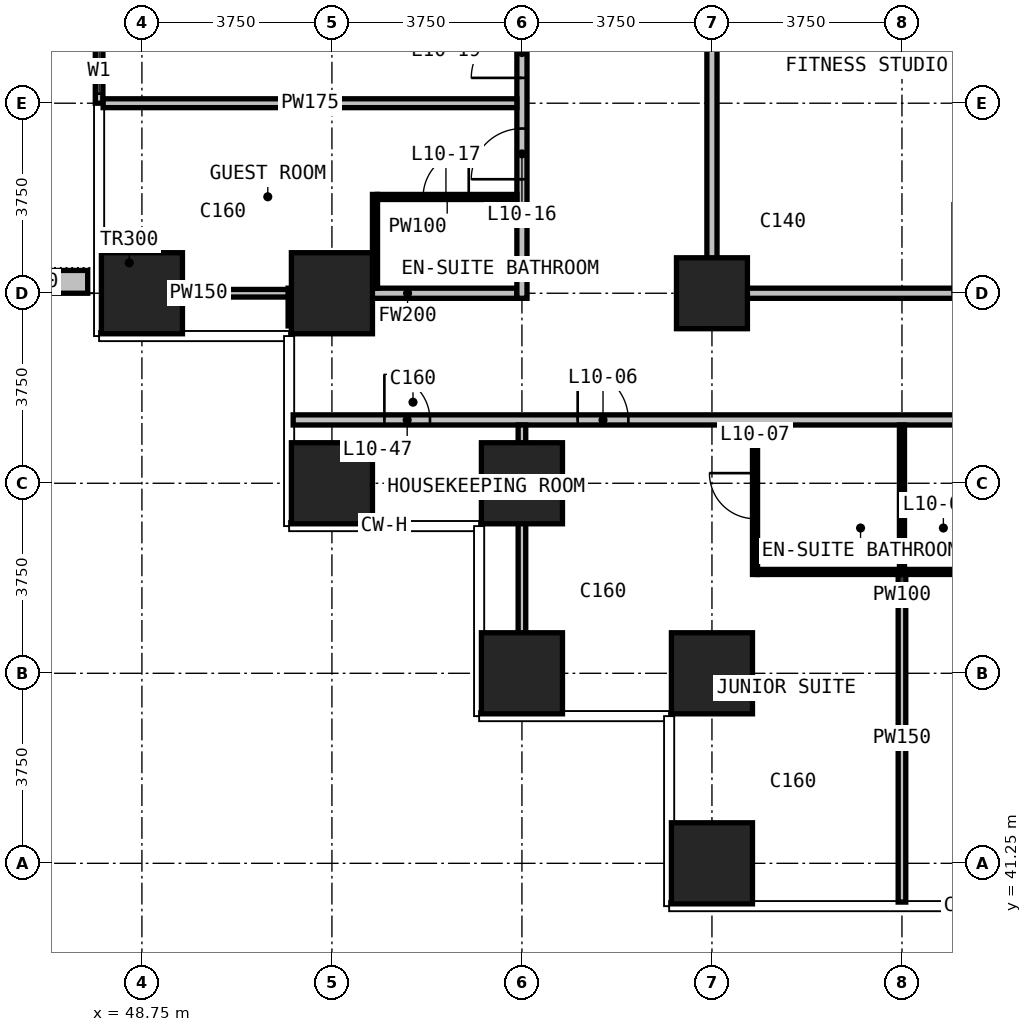
"""IFC4 building model, lengths in metres.
Left out: names, types, materials, properties, quantities, classifications, styles, units other than length and angle.
Written with IfcOpenShell. Run it as: python <this file> out.ifc"""

import sys

from ifc_helpers import new_model, si_unit, direction, frame, frame_2d, origin, origin_2d, place, context, subcontext, project, spatial, rectangle, extrude, element, fill, save


model = new_model("IFC4")
c1 = context("Model", 3, precision=1e-05, world=origin(), true_north=direction((0.0, 1.0)))
c2 = subcontext(c1, "Body", "Model", "MODEL_VIEW")
j1 = project(units=[si_unit("LENGTHUNIT", "METRE"), si_unit("PLANEANGLEUNIT", "RADIAN")], contexts=[c1])
p1 = place(None, origin())
s1 = spatial("IfcSite", under=j1, at=p1, CompositionType="ELEMENT")
p2 = place(p1, origin())
s2 = spatial("IfcBuilding", under=s1, at=p2, CompositionType="ELEMENT")
p3 = place(p2, frame((0.0, 0.0, 52.7)))
s3 = spatial("IfcBuildingStorey", under=s2, at=p3, CompositionType="ELEMENT", Elevation=52.7)
for number, where, z_axis, x_axis in (
    (1, (48.75, 52.5, 0.0), (0.0, 0.0, 1.0), (1.0, 0.0, 0.0)),
    (2, (52.5, 48.75, 0.0), (0.0, 0.0, 1.0), (1.0, 0.0, 0.0)),
    (3, (52.5, 52.5, 0.0), (0.0, 0.0, 1.0), (1.0, 0.0, 0.0)),
    (4, (56.25, 45.0, 0.0), (0.0, 0.0, 1.0), (1.0, 0.0, 0.0)),
    (5, (56.25, 48.75, 0.0), (0.0, 0.0, 1.0), (1.0, 0.0, 0.0)),
    (6, (60.0, 41.25, 0.0), (0.0, 0.0, 1.0), (1.0, 0.0, 0.0)),
    (7, (60.0, 45.0, 0.0), (0.0, 0.0, 1.0), (1.0, 0.0, 0.0)),
):
    element("IfcColumn", number, at=place(p3, frame(where, z_axis=z_axis, x_axis=x_axis)), inside=s3, PredefinedType="COLUMN", context=c2, shape_type="SweptSolid", body=[
        extrude(rectangle(XDim=1.6, YDim=1.6, at=origin_2d()), origin(), (0.0, 0.0, 1.0), 3.3),
    ])
p4 = place(p3, frame((60.0, 52.5, 0.0), z_axis=(0.0, 0.0, 1.0), x_axis=(1.0, 0.0, 0.0)))
e8 = element("IfcColumn", 8, at=p4, inside=s3, PredefinedType="COLUMN", context=c2, shape_type="SweptSolid", body=[
    extrude(rectangle(XDim=1.4, YDim=1.4, at=origin_2d()), origin(), (0.0, 0.0, 1.0), 3.3),
])
p5 = place(p3, frame((47.905, 56.25, 0.0), z_axis=(0.0, 0.0, 1.0), x_axis=(0.0, 1.0, 0.0)))
e9 = element("IfcWall", 9, at=p5, inside=s3, PredefinedType="SOLIDWALL", context=c2, shape_type="SweptSolid", body=[
    extrude(rectangle(XDim=3.75, YDim=0.15, at=frame_2d((1.875, 0.0))), origin(), (0.0, 0.0, 1.0), 3.0),
])
p6 = place(p5, frame((0.188, 0.0, 0.1)))
e10 = element("IfcOpeningElement", 10, at=p6, cuts=e9, PredefinedType="OPENING", context=c2, shape_type="SweptSolid", body=[
    extrude(rectangle(XDim=0.9, YDim=2.4, at=frame_2d((0.45, 1.2))), frame((0.0, 0.085, 0.0), z_axis=(0.0, -1.0, 0.0), x_axis=(1.0, 0.0, 0.0)), (0.0, 0.0, 1.0), 0.17),
])
p7 = place(p5, frame((1.275, 0.0, 0.0)))
e11 = element("IfcOpeningElement", 11, at=p7, cuts=e9, PredefinedType="OPENING", context=c2, shape_type="SweptSolid", body=[
    extrude(rectangle(XDim=1.2, YDim=2.4, at=frame_2d((0.6, 1.2))), frame((0.0, 0.085, 0.0), z_axis=(0.0, -1.0, 0.0), x_axis=(1.0, 0.0, 0.0)), (0.0, 0.0, 1.0), 0.17),
])
p8 = place(p3, frame((47.68, 52.725, 0.0), z_axis=(0.0, 0.0, 1.0), x_axis=(-1.0, 0.0, 0.0)))
e12 = element("IfcWall", 12, at=p8, inside=s3, PredefinedType="USERDEFINED", context=c2, shape_type="SweptSolid", body=[
    extrude(rectangle(XDim=2.33, YDim=0.45, at=frame_2d((1.165, 0.0))), origin(), (0.0, 0.0, 1.0), 1.1),
])
p9 = place(p3, frame((51.735, 50.0, 0.0), z_axis=(0.0, 0.0, 1.0), x_axis=(1.0, 0.0, 0.0)))
e13 = element("IfcWall", 13, at=p9, inside=s3, PredefinedType="PARTITIONING", context=c2, shape_type="SweptSolid", body=[
    extrude(rectangle(XDim=46.53, YDim=0.2, at=frame_2d((23.265, 0.0))), origin(), (0.0, 0.0, 1.0), 3.0),
])
p10 = place(p9, frame((5.615, 0.0, 0.0)))
e14 = element("IfcOpeningElement", 14, at=p10, cuts=e13, PredefinedType="OPENING", context=c2, shape_type="SweptSolid", body=[
    extrude(rectangle(XDim=1.0, YDim=2.2, at=frame_2d((0.5, 1.1))), frame((0.0, 0.11, 0.0), z_axis=(0.0, -1.0, 0.0), x_axis=(1.0, 0.0, 0.0)), (0.0, 0.0, 1.0), 0.22),
])
p11 = place(p9, frame((17.415, 0.0, 0.0)))
e15 = element("IfcOpeningElement", 15, at=p11, cuts=e13, PredefinedType="OPENING", context=c2, shape_type="SweptSolid", body=[
    extrude(rectangle(XDim=1.0, YDim=2.2, at=frame_2d((0.5, 1.1))), frame((0.0, 0.11, 0.0), z_axis=(0.0, -1.0, 0.0), x_axis=(1.0, 0.0, 0.0)), (0.0, 0.0, 1.0), 0.22),
])
p12 = place(p9, frame((20.615, 0.0, 0.0)))
e16 = element("IfcOpeningElement", 16, at=p12, cuts=e13, PredefinedType="OPENING", context=c2, shape_type="SweptSolid", body=[
    extrude(rectangle(XDim=1.0, YDim=2.2, at=frame_2d((0.5, 1.1))), frame((0.0, 0.11, 0.0), z_axis=(0.0, -1.0, 0.0), x_axis=(1.0, 0.0, 0.0)), (0.0, 0.0, 1.0), 0.22),
])
p13 = place(p9, frame((32.415, 0.0, 0.0)))
e17 = element("IfcOpeningElement", 17, at=p13, cuts=e13, PredefinedType="OPENING", context=c2, shape_type="SweptSolid", body=[
    extrude(rectangle(XDim=1.0, YDim=2.2, at=frame_2d((0.5, 1.1))), frame((0.0, 0.11, 0.0), z_axis=(0.0, -1.0, 0.0), x_axis=(1.0, 0.0, 0.0)), (0.0, 0.0, 1.0), 0.22),
])
p14 = place(p9, frame((35.615, 0.0, 0.0)))
e18 = element("IfcOpeningElement", 18, at=p14, cuts=e13, PredefinedType="OPENING", context=c2, shape_type="SweptSolid", body=[
    extrude(rectangle(XDim=1.0, YDim=2.2, at=frame_2d((0.5, 1.1))), frame((0.0, 0.11, 0.0), z_axis=(0.0, -1.0, 0.0), x_axis=(1.0, 0.0, 0.0)), (0.0, 0.0, 1.0), 0.22),
])
p15 = place(p9, frame((1.8, 0.0, 0.0)))
e19 = element("IfcOpeningElement", 19, at=p15, cuts=e13, PredefinedType="OPENING", context=c2, shape_type="SweptSolid", body=[
    extrude(rectangle(XDim=0.9, YDim=2.2, at=frame_2d((0.45, 1.1))), frame((0.0, 0.11, 0.0), z_axis=(0.0, -1.0, 0.0), x_axis=(1.0, 0.0, 0.0)), (0.0, 0.0, 1.0), 0.22),
])
p16 = place(p9, frame((43.815, 0.0, 0.0)))
e20 = element("IfcOpeningElement", 20, at=p16, cuts=e13, PredefinedType="OPENING", context=c2, shape_type="SweptSolid", body=[
    extrude(rectangle(XDim=0.9, YDim=2.2, at=frame_2d((0.45, 1.1))), frame((0.0, 0.11, 0.0), z_axis=(0.0, -1.0, 0.0), x_axis=(1.0, 0.0, 0.0)), (0.0, 0.0, 1.0), 0.22),
])
p17 = place(p3, frame((51.835, 52.5, 0.0), z_axis=(0.0, 0.0, 1.0), x_axis=(1.0, 0.0, 0.0)))
e21 = element("IfcWall", 21, at=p17, inside=s3, PredefinedType="PARTITIONING", context=c2, shape_type="SweptSolid", body=[
    extrude(rectangle(XDim=4.315, YDim=0.2, at=frame_2d((2.157, 0.0))), origin(), (0.0, 0.0, 1.0), 3.0),
])
p18 = place(p3, frame((60.1, 52.5, 0.0), z_axis=(0.0, 0.0, 1.0), x_axis=(1.0, 0.0, 0.0)))
e22 = element("IfcWall", 22, at=p18, inside=s3, PredefinedType="PARTITIONING", context=c2, shape_type="SweptSolid", body=[
    extrude(rectangle(XDim=29.8, YDim=0.2, at=frame_2d((14.9, 0.0))), origin(), (0.0, 0.0, 1.0), 3.0),
])
p19 = place(p18, frame((4.65, 0.0, 0.0)))
e23 = element("IfcOpeningElement", 23, at=p19, cuts=e22, PredefinedType="OPENING", context=c2, shape_type="SweptSolid", body=[
    extrude(rectangle(XDim=1.8, YDim=2.2, at=frame_2d((0.9, 1.1))), frame((0.0, 0.11, 0.0), z_axis=(0.0, -1.0, 0.0), x_axis=(1.0, 0.0, 0.0)), (0.0, 0.0, 1.0), 0.22),
])
p20 = place(p18, frame((15.6, 0.0, 0.0)))
e24 = element("IfcOpeningElement", 24, at=p20, cuts=e22, PredefinedType="OPENING", context=c2, shape_type="SweptSolid", body=[
    extrude(rectangle(XDim=1.0, YDim=2.2, at=frame_2d((0.5, 1.1))), frame((0.0, 0.11, 0.0), z_axis=(0.0, -1.0, 0.0), x_axis=(1.0, 0.0, 0.0)), (0.0, 0.0, 1.0), 0.22),
])
p21 = place(p18, frame((23.1, 0.0, 0.0)))
e25 = element("IfcOpeningElement", 25, at=p21, cuts=e22, PredefinedType="OPENING", context=c2, shape_type="SweptSolid", body=[
    extrude(rectangle(XDim=1.0, YDim=2.2, at=frame_2d((0.5, 1.1))), frame((0.0, 0.11, 0.0), z_axis=(0.0, -1.0, 0.0), x_axis=(1.0, 0.0, 0.0)), (0.0, 0.0, 1.0), 0.22),
])
p22 = place(p3, frame((51.735, 51.855, 0.0), z_axis=(0.0, 0.0, 1.0), x_axis=(0.0, 1.0, 0.0)))
e26 = element("IfcWall", 26, at=p22, inside=s3, PredefinedType="PARTITIONING", context=c2, shape_type="SweptSolid", body=[
    extrude(rectangle(XDim=0.745, YDim=0.2, at=frame_2d((0.373, 0.0))), origin(), (0.0, 0.0, 1.0), 3.0),
])
p23 = place(p3, frame((56.25, 52.4, 0.0), z_axis=(0.0, 0.0, 1.0), x_axis=(0.0, 1.0, 0.0)))
e27 = element("IfcWall", 27, at=p23, inside=s3, PredefinedType="PARTITIONING", context=c2, shape_type="SweptSolid", body=[
    extrude(rectangle(XDim=33.925, YDim=0.2, at=frame_2d((16.962, 0.0))), origin(), (0.0, 0.0, 1.0), 3.0),
])
p24 = place(p23, frame((2.35, 0.0, 0.0)))
e28 = element("IfcOpeningElement", 28, at=p24, cuts=e27, PredefinedType="OPENING", context=c2, shape_type="SweptSolid", body=[
    extrude(rectangle(XDim=1.0, YDim=2.2, at=frame_2d((0.5, 1.1))), frame((0.0, 0.11, 0.0), z_axis=(0.0, -1.0, 0.0), x_axis=(1.0, 0.0, 0.0)), (0.0, 0.0, 1.0), 0.22),
])
p25 = place(p23, frame((4.35, 0.0, 0.0)))
e29 = element("IfcOpeningElement", 29, at=p25, cuts=e27, PredefinedType="OPENING", context=c2, shape_type="SweptSolid", body=[
    extrude(rectangle(XDim=1.0, YDim=2.2, at=frame_2d((0.5, 1.1))), frame((0.0, 0.11, 0.0), z_axis=(0.0, -1.0, 0.0), x_axis=(1.0, 0.0, 0.0)), (0.0, 0.0, 1.0), 0.22),
])
p26 = place(p23, frame((9.85, 0.0, 0.0)))
e30 = element("IfcOpeningElement", 30, at=p26, cuts=e27, PredefinedType="OPENING", context=c2, shape_type="SweptSolid", body=[
    extrude(rectangle(XDim=1.0, YDim=2.2, at=frame_2d((0.5, 1.1))), frame((0.0, 0.11, 0.0), z_axis=(0.0, -1.0, 0.0), x_axis=(1.0, 0.0, 0.0)), (0.0, 0.0, 1.0), 0.22),
])
p27 = place(p23, frame((11.85, 0.0, 0.0)))
e31 = element("IfcOpeningElement", 31, at=p27, cuts=e27, PredefinedType="OPENING", context=c2, shape_type="SweptSolid", body=[
    extrude(rectangle(XDim=1.0, YDim=2.2, at=frame_2d((0.5, 1.1))), frame((0.0, 0.11, 0.0), z_axis=(0.0, -1.0, 0.0), x_axis=(1.0, 0.0, 0.0)), (0.0, 0.0, 1.0), 0.22),
])
p28 = place(p23, frame((17.35, 0.0, 0.0)))
e32 = element("IfcOpeningElement", 32, at=p28, cuts=e27, PredefinedType="OPENING", context=c2, shape_type="SweptSolid", body=[
    extrude(rectangle(XDim=1.0, YDim=2.2, at=frame_2d((0.5, 1.1))), frame((0.0, 0.11, 0.0), z_axis=(0.0, -1.0, 0.0), x_axis=(1.0, 0.0, 0.0)), (0.0, 0.0, 1.0), 0.22),
])
p29 = place(p23, frame((19.35, 0.0, 0.0)))
e33 = element("IfcOpeningElement", 33, at=p29, cuts=e27, PredefinedType="OPENING", context=c2, shape_type="SweptSolid", body=[
    extrude(rectangle(XDim=1.0, YDim=2.2, at=frame_2d((0.5, 1.1))), frame((0.0, 0.11, 0.0), z_axis=(0.0, -1.0, 0.0), x_axis=(1.0, 0.0, 0.0)), (0.0, 0.0, 1.0), 0.22),
])
p30 = place(p23, frame((24.85, 0.0, 0.0)))
e34 = element("IfcOpeningElement", 34, at=p30, cuts=e27, PredefinedType="OPENING", context=c2, shape_type="SweptSolid", body=[
    extrude(rectangle(XDim=1.0, YDim=2.2, at=frame_2d((0.5, 1.1))), frame((0.0, 0.11, 0.0), z_axis=(0.0, -1.0, 0.0), x_axis=(1.0, 0.0, 0.0)), (0.0, 0.0, 1.0), 0.22),
])
p31 = place(p23, frame((26.85, 0.0, 0.0)))
e35 = element("IfcOpeningElement", 35, at=p31, cuts=e27, PredefinedType="OPENING", context=c2, shape_type="SweptSolid", body=[
    extrude(rectangle(XDim=1.0, YDim=2.2, at=frame_2d((0.5, 1.1))), frame((0.0, 0.11, 0.0), z_axis=(0.0, -1.0, 0.0), x_axis=(1.0, 0.0, 0.0)), (0.0, 0.0, 1.0), 0.22),
])
p32 = place(p23, frame((31.55, 0.0, 0.0)))
e36 = element("IfcOpeningElement", 36, at=p32, cuts=e27, PredefinedType="OPENING", context=c2, shape_type="SweptSolid", body=[
    extrude(rectangle(XDim=0.9, YDim=2.2, at=frame_2d((0.45, 1.1))), frame((0.0, 0.11, 0.0), z_axis=(0.0, -1.0, 0.0), x_axis=(1.0, 0.0, 0.0)), (0.0, 0.0, 1.0), 0.22),
])
p33 = place(p3, frame((60.0, 52.4, 0.0), z_axis=(0.0, 0.0, 1.0), x_axis=(0.0, 1.0, 0.0)))
e37 = element("IfcWall", 37, at=p33, inside=s3, PredefinedType="PARTITIONING", context=c2, shape_type="SweptSolid", body=[
    extrude(rectangle(XDim=18.84, YDim=0.2, at=frame_2d((9.42, 0.0))), origin(), (0.0, 0.0, 1.0), 3.0),
])
p34 = place(p33, frame((10.9, 0.0, 0.0)))
e38 = element("IfcOpeningElement", 38, at=p34, cuts=e37, PredefinedType="OPENING", context=c2, shape_type="SweptSolid", body=[
    extrude(rectangle(XDim=0.9, YDim=2.2, at=frame_2d((0.45, 1.1))), frame((0.0, 0.11, 0.0), z_axis=(0.0, -1.0, 0.0), x_axis=(1.0, 0.0, 0.0)), (0.0, 0.0, 1.0), 0.22),
])
p35 = place(p33, frame((16.5, 0.0, 0.0)))
e39 = element("IfcOpeningElement", 39, at=p35, cuts=e37, PredefinedType="OPENING", context=c2, shape_type="SweptSolid", body=[
    extrude(rectangle(XDim=0.9, YDim=2.2, at=frame_2d((0.45, 1.1))), frame((0.0, 0.11, 0.0), z_axis=(0.0, -1.0, 0.0), x_axis=(1.0, 0.0, 0.0)), (0.0, 0.0, 1.0), 0.22),
])
p36 = place(p3, frame((47.985, 56.25, 0.0), z_axis=(0.0, 0.0, 1.0), x_axis=(1.0, 0.0, 0.0)))
e40 = element("IfcWall", 40, at=p36, inside=s3, PredefinedType="PARTITIONING", context=c2, shape_type="SweptSolid", body=[
    extrude(rectangle(XDim=8.165, YDim=0.175, at=frame_2d((4.083, 0.0))), origin(), (0.0, 0.0, 1.0), 3.0),
])
p37 = place(p3, frame((48.105, 52.5, 0.0), z_axis=(0.0, 0.0, 1.0), x_axis=(1.0, 0.0, 0.0)))
e41 = element("IfcWall", 41, at=p37, inside=s3, PredefinedType="PARTITIONING", context=c2, shape_type="SweptSolid", body=[
    extrude(rectangle(XDim=3.53, YDim=0.15, at=frame_2d((1.765, 0.0))), origin(), (0.0, 0.0, 1.0), 3.0),
])
p38 = place(p3, frame((56.25, 44.235, 0.0), z_axis=(0.0, 0.0, 1.0), x_axis=(0.0, 1.0, 0.0)))
e42 = element("IfcWall", 42, at=p38, inside=s3, PredefinedType="PARTITIONING", context=c2, shape_type="SweptSolid", body=[
    extrude(rectangle(XDim=5.665, YDim=0.15, at=frame_2d((2.833, 0.0))), origin(), (0.0, 0.0, 1.0), 3.0),
])
p39 = place(p3, frame((63.75, 40.485, 0.0), z_axis=(0.0, 0.0, 1.0), x_axis=(0.0, 1.0, 0.0)))
e43 = element("IfcWall", 43, at=p39, inside=s3, PredefinedType="PARTITIONING", context=c2, shape_type="SweptSolid", body=[
    extrude(rectangle(XDim=6.465, YDim=0.15, at=frame_2d((3.232, 0.0))), origin(), (0.0, 0.0, 1.0), 3.0),
])
p40 = place(p3, frame((60.9, 47.0, 0.0), z_axis=(0.0, 0.0, 1.0), x_axis=(1.0, 0.0, 0.0)))
e44 = element("IfcWall", 44, at=p40, inside=s3, PredefinedType="PARTITIONING", context=c2, shape_type="SweptSolid", body=[
    extrude(rectangle(XDim=5.7, YDim=0.1, at=frame_2d((2.85, 0.0))), origin(), (0.0, 0.0, 1.0), 3.0),
])
p41 = place(p3, frame((53.4, 54.4, 0.0), z_axis=(0.0, 0.0, 1.0), x_axis=(1.0, 0.0, 0.0)))
e45 = element("IfcWall", 45, at=p41, inside=s3, PredefinedType="PARTITIONING", context=c2, shape_type="SweptSolid", body=[
    extrude(rectangle(XDim=2.75, YDim=0.1, at=frame_2d((1.375, 0.0))), origin(), (0.0, 0.0, 1.0), 3.0),
])
p42 = place(p41, frame((0.9, 0.0, 0.0)))
e46 = element("IfcOpeningElement", 46, at=p42, cuts=e45, PredefinedType="OPENING", context=c2, shape_type="SweptSolid", body=[
    extrude(rectangle(XDim=0.9, YDim=2.2, at=frame_2d((0.45, 1.1))), frame((0.0, 0.06, 0.0), z_axis=(0.0, -1.0, 0.0), x_axis=(1.0, 0.0, 0.0)), (0.0, 0.0, 1.0), 0.12),
])
p43 = place(p3, frame((53.35, 52.6, 0.0), z_axis=(0.0, 0.0, 1.0), x_axis=(0.0, 1.0, 0.0)))
e47 = element("IfcWall", 47, at=p43, inside=s3, PredefinedType="PARTITIONING", context=c2, shape_type="SweptSolid", body=[
    extrude(rectangle(XDim=1.85, YDim=0.1, at=frame_2d((0.925, 0.0))), origin(), (0.0, 0.0, 1.0), 3.0),
])
p44 = place(p3, frame((60.85, 46.95, 0.0), z_axis=(0.0, 0.0, 1.0), x_axis=(0.0, 1.0, 0.0)))
e48 = element("IfcWall", 48, at=p44, inside=s3, PredefinedType="PARTITIONING", context=c2, shape_type="SweptSolid", body=[
    extrude(rectangle(XDim=2.95, YDim=0.1, at=frame_2d((1.475, 0.0))), origin(), (0.0, 0.0, 1.0), 3.0),
])
p45 = place(p44, frame((1.1, 0.0, 0.0)))
e49 = element("IfcOpeningElement", 49, at=p45, cuts=e48, PredefinedType="OPENING", context=c2, shape_type="SweptSolid", body=[
    extrude(rectangle(XDim=0.9, YDim=2.2, at=frame_2d((0.45, 1.1))), frame((0.0, 0.06, 0.0), z_axis=(0.0, -1.0, 0.0), x_axis=(1.0, 0.0, 0.0)), (0.0, 0.0, 1.0), 0.12),
])
p46 = place(p3, frame((63.75, 47.05, 0.0), z_axis=(0.0, 0.0, 1.0), x_axis=(0.0, 1.0, 0.0)))
e50 = element("IfcWall", 50, at=p46, inside=s3, PredefinedType="PARTITIONING", context=c2, shape_type="SweptSolid", body=[
    extrude(rectangle(XDim=2.85, YDim=0.1, at=frame_2d((1.425, 0.0))), origin(), (0.0, 0.0, 1.0), 3.0),
])
p47 = place(p6, origin())
e51 = element("IfcWindow", 51, at=p47, inside=s3, PartitioningType="SINGLE_PANEL", PredefinedType="WINDOW", context=c2, shape_type="SweptSolid", body=[
    extrude(rectangle(XDim=0.9, YDim=2.4, at=frame_2d((0.45, 1.2))), frame((0.0, 0.03, 0.0), z_axis=(0.0, -1.0, 0.0), x_axis=(1.0, 0.0, 0.0)), (0.0, 0.0, 1.0), 0.06),
])
fill(e10, e51)
p48 = place(p10, origin())
e52 = element("IfcDoor", 52, at=p48, inside=s3, OperationType="SINGLE_SWING_LEFT", PredefinedType="DOOR", context=c2, shape_type="SweptSolid", body=[
    extrude(rectangle(XDim=1.0, YDim=2.2, at=frame_2d((0.5, 1.1))), frame((0.0, 0.025, 0.0), z_axis=(0.0, -1.0, 0.0), x_axis=(1.0, 0.0, 0.0)), (0.0, 0.0, 1.0), 0.05),
])
fill(e14, e52)
p49 = place(p45, origin())
e53 = element("IfcDoor", 53, at=p49, inside=s3, OperationType="SINGLE_SWING_RIGHT", PredefinedType="DOOR", context=c2, shape_type="SweptSolid", body=[
    extrude(rectangle(XDim=0.9, YDim=2.2, at=frame_2d((0.45, 1.1))), frame((0.0, 0.025, 0.0), z_axis=(0.0, -1.0, 0.0), x_axis=(1.0, 0.0, 0.0)), (0.0, 0.0, 1.0), 0.05),
])
fill(e49, e53)
p50 = place(p24, origin())
e54 = element("IfcDoor", 54, at=p50, inside=s3, OperationType="SINGLE_SWING_RIGHT", PredefinedType="DOOR", context=c2, shape_type="SweptSolid", body=[
    extrude(rectangle(XDim=1.0, YDim=2.2, at=frame_2d((0.5, 1.1))), frame((0.0, 0.025, 0.0), z_axis=(0.0, -1.0, 0.0), x_axis=(1.0, 0.0, 0.0)), (0.0, 0.0, 1.0), 0.05),
])
fill(e28, e54)
p51 = place(p42, origin())
e55 = element("IfcDoor", 55, at=p51, inside=s3, OperationType="SINGLE_SWING_RIGHT", PredefinedType="DOOR", context=c2, shape_type="SweptSolid", body=[
    extrude(rectangle(XDim=0.9, YDim=2.2, at=frame_2d((0.45, 1.1))), frame((0.0, 0.025, 0.0), z_axis=(0.0, -1.0, 0.0), x_axis=(1.0, 0.0, 0.0)), (0.0, 0.0, 1.0), 0.05),
])
fill(e46, e55)
p52 = place(p25, origin())
e56 = element("IfcDoor", 56, at=p52, inside=s3, OperationType="SINGLE_SWING_LEFT", PredefinedType="DOOR", context=c2, shape_type="SweptSolid", body=[
    extrude(rectangle(XDim=1.0, YDim=2.2, at=frame_2d((0.5, 1.1))), frame((0.0, 0.025, 0.0), z_axis=(0.0, -1.0, 0.0), x_axis=(1.0, 0.0, 0.0)), (0.0, 0.0, 1.0), 0.05),
])
fill(e29, e56)
p53 = place(p15, origin())
e57 = element("IfcDoor", 57, at=p53, inside=s3, OperationType="SINGLE_SWING_LEFT", PredefinedType="DOOR", context=c2, shape_type="SweptSolid", body=[
    extrude(rectangle(XDim=0.9, YDim=2.2, at=frame_2d((0.45, 1.1))), frame((0.0, 0.025, 0.0), z_axis=(0.0, -1.0, 0.0), x_axis=(1.0, 0.0, 0.0)), (0.0, 0.0, 1.0), 0.05),
])
fill(e19, e57)
p54 = place(p19, origin())
e58 = element("IfcDoor", 58, at=p54, inside=s3, OperationType="DOUBLE_DOOR_SINGLE_SWING", PredefinedType="DOOR", context=c2, shape_type="SweptSolid", body=[
    extrude(rectangle(XDim=1.8, YDim=2.2, at=frame_2d((0.9, 1.1))), frame((0.0, 0.025, 0.0), z_axis=(0.0, -1.0, 0.0), x_axis=(1.0, 0.0, 0.0)), (0.0, 0.0, 1.0), 0.05),
])
fill(e23, e58)
save(model, sys.argv[1])
